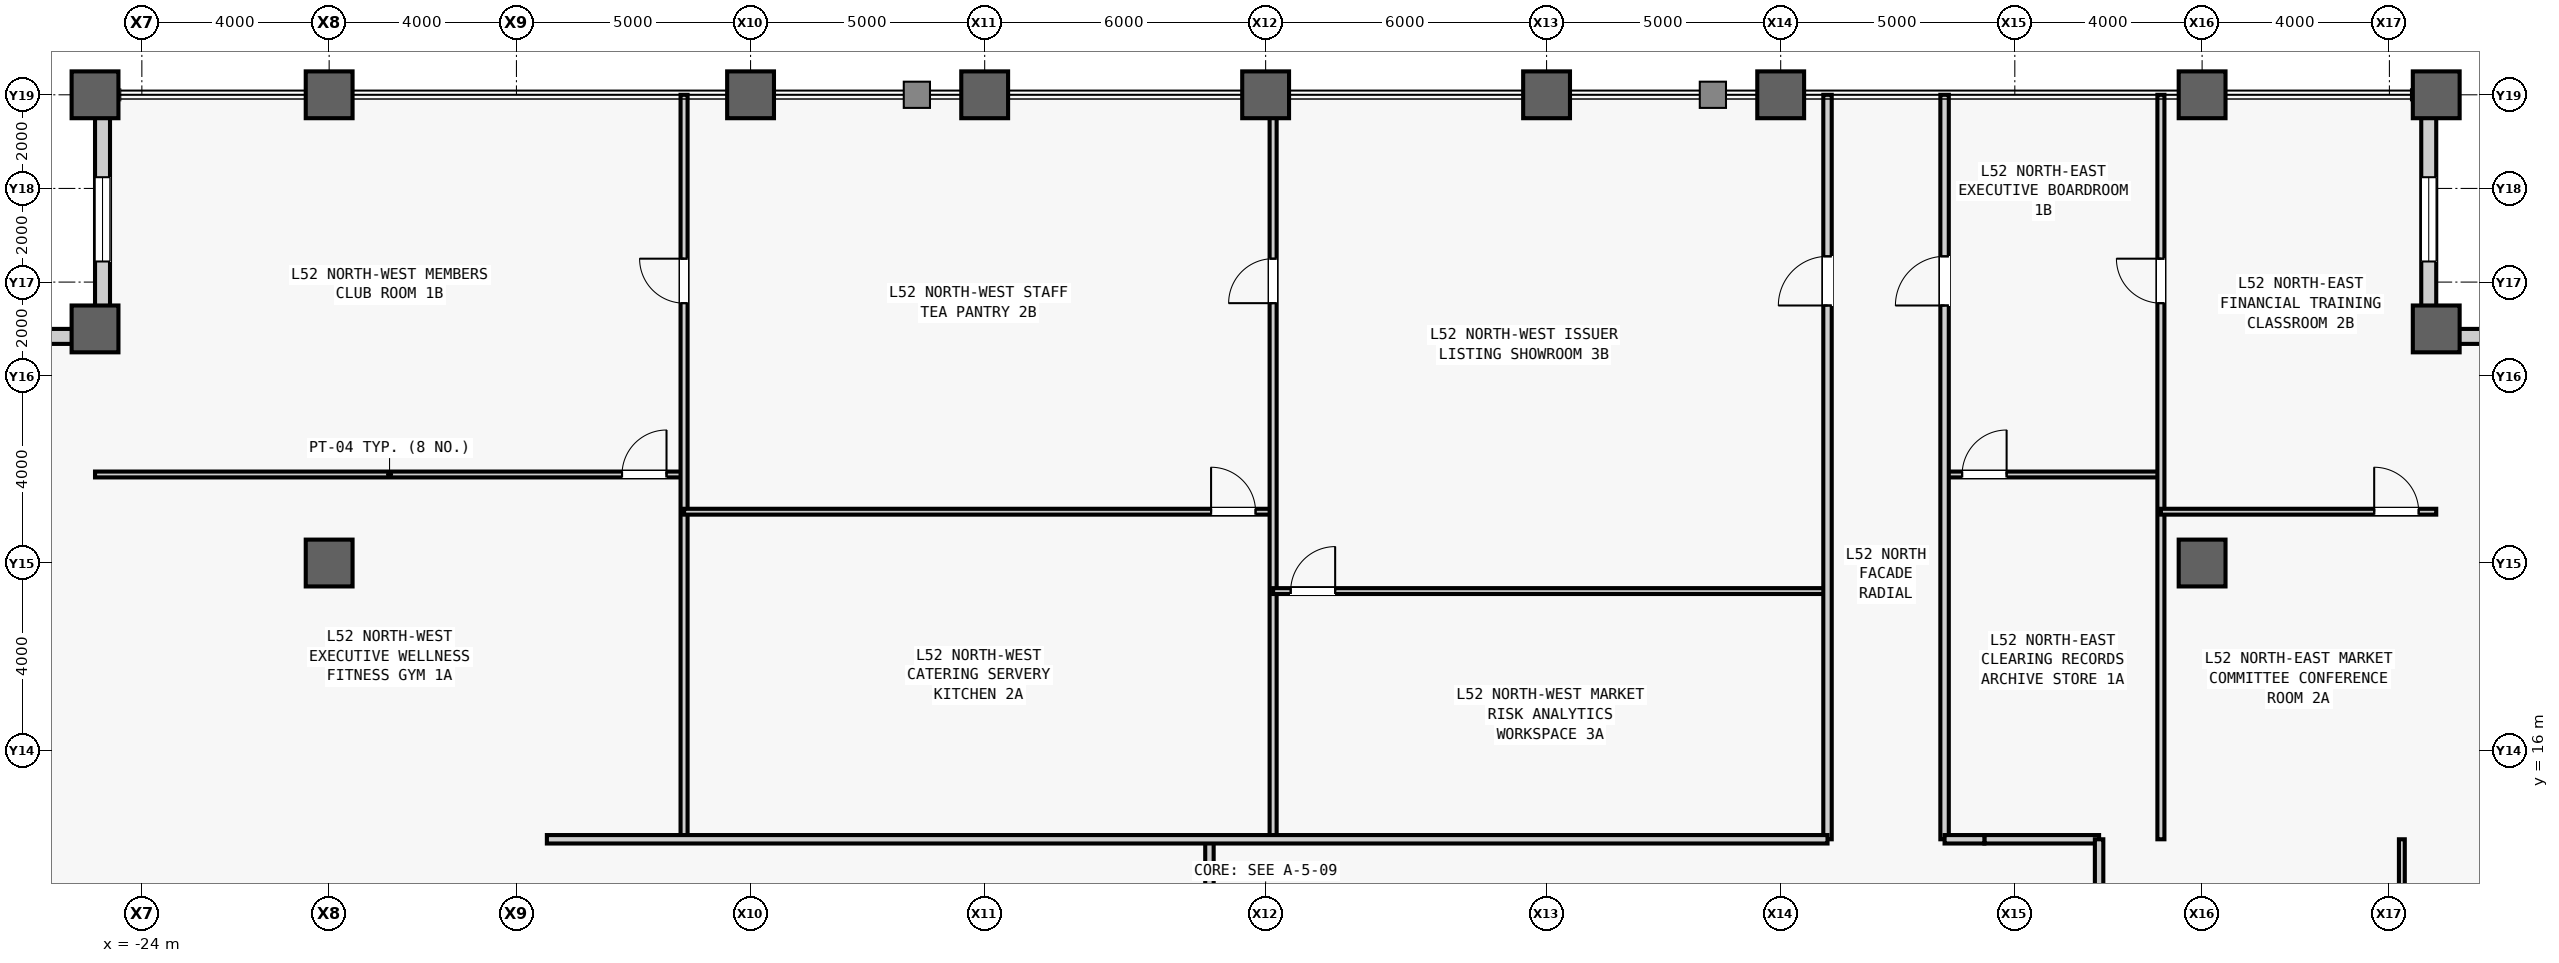
"""IFC4 building model, lengths in metres.
Left out: names, types, materials, properties, quantities, classifications, styles, units other than length and angle.
Written with IfcOpenShell. Run it as: python <this file> out.ifc"""

import sys

from ifc_helpers import new_model, si_unit, direction, frame, frame_2d, origin, origin_2d, place, context, subcontext, project, spatial, rectangle, hollow_rectangle, extrude, source, transform, mapped, element, fill, save


model = new_model("IFC4")
c1 = context("Model", 3, precision=1e-05, world=origin(), true_north=direction((0.0, 1.0)))
c2 = subcontext(c1, "Body", "Model", "MODEL_VIEW")
j1 = project(units=[si_unit("LENGTHUNIT", "METRE"), si_unit("PLANEANGLEUNIT", "RADIAN")], contexts=[c1])
p1 = place(None, origin())
s1 = spatial("IfcSite", under=j1, at=p1, CompositionType="ELEMENT")
p2 = place(p1, origin())
s2 = spatial("IfcBuilding", under=s1, at=p2, CompositionType="ELEMENT")
p3 = place(p2, frame((0.0, 0.0, 223.1)))
s3 = spatial("IfcBuildingStorey", under=s2, at=p3, CompositionType="ELEMENT", Elevation=223.1)
m1 = source(origin(), c2, "Body", "SweptSolid", [
    extrude(hollow_rectangle(XDim=1.0, YDim=1.0, WallThickness=0.055, at=origin_2d()), origin(), (0.0, 0.0, 1.0), 4.0),
])
for number, where, z_axis, x_axis in (
    (1, (-25.0, 25.0, 0.0), (0.0, 0.0, 1.0), (1.0, 0.0, 0.0)),
    (2, (-25.0, 30.0, 0.0), (0.0, 0.0, 1.0), (1.0, 0.0, 0.0)),
    (3, (-20.0, 20.0, 0.0), (0.0, 0.0, 1.0), (1.0, 0.0, 0.0)),
    (4, (-20.0, 30.0, 0.0), (0.0, 0.0, 1.0), (1.0, 0.0, 0.0)),
    (5, (-11.0, 30.0, 0.0), (0.0, 0.0, 1.0), (1.0, 0.0, 0.0)),
    (6, (-6.0, 30.0, 0.0), (0.0, 0.0, 1.0), (1.0, 0.0, 0.0)),
    (7, (0.0, 30.0, 0.0), (0.0, 0.0, 1.0), (1.0, 0.0, 0.0)),
    (8, (6.0, 30.0, 0.0), (0.0, 0.0, 1.0), (1.0, 0.0, 0.0)),
    (9, (11.0, 30.0, 0.0), (0.0, 0.0, 1.0), (1.0, 0.0, 0.0)),
    (10, (20.0, 20.0, 0.0), (0.0, 0.0, 1.0), (1.0, 0.0, 0.0)),
    (11, (20.0, 30.0, 0.0), (0.0, 0.0, 1.0), (1.0, 0.0, 0.0)),
    (12, (25.0, 25.0, 0.0), (0.0, 0.0, 1.0), (1.0, 0.0, 0.0)),
    (13, (25.0, 30.0, 0.0), (0.0, 0.0, 1.0), (1.0, 0.0, 0.0)),
):
    element("IfcColumn", number, at=place(p3, frame(where, z_axis=z_axis, x_axis=x_axis)), inside=s3, PredefinedType="COLUMN", context=c2, shape_type="MappedRepresentation", body=[
        mapped(m1, transform((0.0, 0.0, 0.0), scale=1.0)),
    ])
m2 = source(origin(), c2, "Body", "SweptSolid", [
    extrude(rectangle(XDim=4.68, YDim=0.32, at=frame_2d((2.34, 0.0))), origin(), (0.0, 0.0, 1.0), 3.164),
])
p4 = place(p3, frame((25.0, 24.84, 0.0), z_axis=(0.0, 0.0, 1.0), x_axis=(1.0, 0.0, 0.0)))
e14 = element("IfcWall", 14, at=p4, inside=s3, PredefinedType="STANDARD", context=c2, shape_type="MappedRepresentation", body=[
    mapped(m2, transform((0.0, 0.0, 0.0), scale=1.0)),
])
m3 = source(origin(), c2, "Body", "SweptSolid", [
    extrude(rectangle(XDim=1.8, YDim=2.4, at=frame_2d((0.9, 1.2))), frame((0.0, 0.17, 0.0), z_axis=(0.0, -1.0, 0.0), x_axis=(1.0, 0.0, 0.0)), (0.0, 0.0, 1.0), 0.34),
])
p5 = place(p4, frame((1.44, 0.0, 0.5)))
e15 = element("IfcOpeningElement", 15, at=p5, cuts=e14, PredefinedType="OPENING", context=c2, shape_type="MappedRepresentation", body=[
    mapped(m3, transform((0.0, 0.0, 0.0), scale=1.0)),
])
p6 = place(p3, frame((24.84, 25.0, 0.0), z_axis=(0.0, 0.0, 1.0), x_axis=(0.0, 1.0, 0.0)))
e16 = element("IfcWall", 16, at=p6, inside=s3, PredefinedType="STANDARD", context=c2, shape_type="MappedRepresentation", body=[
    mapped(m2, transform((0.0, 0.0, 0.0), scale=1.0)),
])
p7 = place(p6, frame((1.44, 0.0, 0.5)))
e17 = element("IfcOpeningElement", 17, at=p7, cuts=e16, PredefinedType="OPENING", context=c2, shape_type="MappedRepresentation", body=[
    mapped(m3, transform((0.0, 0.0, 0.0), scale=1.0)),
])
p8 = place(p3, frame((-24.84, 25.0, 0.0), z_axis=(0.0, 0.0, 1.0), x_axis=(0.0, 1.0, 0.0)))
e18 = element("IfcWall", 18, at=p8, inside=s3, PredefinedType="STANDARD", context=c2, shape_type="MappedRepresentation", body=[
    mapped(m2, transform((0.0, 0.0, 0.0), scale=1.0)),
])
p9 = place(p8, frame((1.44, 0.0, 0.5)))
e19 = element("IfcOpeningElement", 19, at=p9, cuts=e18, PredefinedType="OPENING", context=c2, shape_type="MappedRepresentation", body=[
    mapped(m3, transform((0.0, 0.0, 0.0), scale=1.0)),
])
p10 = place(p3, frame((-25.0, 24.84, 0.0), z_axis=(0.0, 0.0, 1.0), x_axis=(-1.0, 0.0, 0.0)))
e20 = element("IfcWall", 20, at=p10, inside=s3, PredefinedType="STANDARD", context=c2, shape_type="MappedRepresentation", body=[
    mapped(m2, transform((0.0, 0.0, 0.0), scale=1.0)),
])
p11 = place(p10, frame((1.44, 0.0, 0.5)))
e21 = element("IfcOpeningElement", 21, at=p11, cuts=e20, PredefinedType="OPENING", context=c2, shape_type="MappedRepresentation", body=[
    mapped(m3, transform((0.0, 0.0, 0.0), scale=1.0)),
])
m4 = source(origin(), c2, "Body", "SweptSolid", [
    extrude(rectangle(XDim=2.45, YDim=0.18, at=frame_2d((1.225, 0.0))), origin(), (0.0, 0.0, 1.0), 3.78),
])
p12 = place(p3, frame((15.35, 14.1, 0.0), z_axis=(0.0, 0.0, 1.0), x_axis=(1.0, 0.0, 0.0)))
e22 = element("IfcWall", 22, at=p12, inside=s3, PredefinedType="PARTITIONING", context=c2, shape_type="MappedRepresentation", body=[
    mapped(m4, transform((0.0, 0.0, 0.0), scale=1.0)),
])
m5 = source(origin(), c2, "Body", "SweptSolid", [
    extrude(rectangle(XDim=3.1, YDim=0.18, at=frame_2d((1.55, 0.0))), origin(), (0.0, 0.0, 1.0), 3.78),
])
p13 = place(p3, frame((-1.2, 11.0, 0.0), z_axis=(0.0, 0.0, 1.0), x_axis=(0.0, 1.0, 0.0)))
e23 = element("IfcWall", 23, at=p13, inside=s3, PredefinedType="PARTITIONING", context=c2, shape_type="MappedRepresentation", body=[
    mapped(m5, transform((0.0, 0.0, 0.0), scale=1.0)),
])
m6 = source(origin(), c2, "Body", "SweptSolid", [
    extrude(rectangle(XDim=12.58, YDim=0.125, at=frame_2d((6.29, 0.0))), origin(), (0.0, 0.0, 1.0), 3.78),
])
p14 = place(p3, frame((-25.0, 21.891, 0.0), z_axis=(0.0, 0.0, 1.0), x_axis=(1.0, 0.0, 0.0)))
e24 = element("IfcWall", 24, at=p14, inside=s3, PredefinedType="PARTITIONING", context=c2, shape_type="MappedRepresentation", body=[
    mapped(m6, transform((0.0, 0.0, 0.0), scale=1.0)),
])
m7 = source(origin(), c2, "Body", "SweptSolid", [
    extrude(rectangle(XDim=0.95, YDim=2.15, at=frame_2d((0.475, 1.075))), frame((0.0, 0.073, 0.0), z_axis=(0.0, -1.0, 0.0), x_axis=(1.0, 0.0, 0.0)), (0.0, 0.0, 1.0), 0.145),
])
p15 = place(p14, frame((11.255, 0.0, 0.0)))
e25 = element("IfcOpeningElement", 25, at=p15, cuts=e24, PredefinedType="OPENING", context=c2, shape_type="MappedRepresentation", body=[
    mapped(m7, transform((0.0, 0.0, 0.0), scale=1.0)),
])
m8 = source(origin(), c2, "Body", "SweptSolid", [
    extrude(rectangle(XDim=15.9, YDim=0.15, at=frame_2d((7.95, 0.0))), origin(), (0.0, 0.0, 1.0), 3.78),
])
p16 = place(p3, frame((-12.42, 14.1, 0.0), z_axis=(0.0, 0.0, 1.0), x_axis=(0.0, 1.0, 0.0)))
e26 = element("IfcWall", 26, at=p16, inside=s3, PredefinedType="PARTITIONING", context=c2, shape_type="MappedRepresentation", body=[
    mapped(m8, transform((0.0, 0.0, 0.0), scale=1.0)),
])
m9 = source(origin(), c2, "Body", "SweptSolid", [
    extrude(rectangle(XDim=0.95, YDim=2.15, at=frame_2d((0.475, 1.075))), frame((0.0, 0.085, 0.0), z_axis=(0.0, -1.0, 0.0), x_axis=(1.0, 0.0, 0.0)), (0.0, 0.0, 1.0), 0.17),
])
p17 = place(p16, frame((11.45, 0.0, 0.0)))
e27 = element("IfcOpeningElement", 27, at=p17, cuts=e26, PredefinedType="OPENING", context=c2, shape_type="MappedRepresentation", body=[
    mapped(m9, transform((0.0, 0.0, 0.0), scale=1.0)),
])
m10 = source(origin(), c2, "Body", "SweptSolid", [
    extrude(rectangle(XDim=12.58, YDim=0.125, at=frame_2d((6.29, 0.0))), origin(), (0.0, 0.0, 1.0), 3.78),
])
p18 = place(p3, frame((-12.42, 21.096, 0.0), z_axis=(0.0, 0.0, 1.0), x_axis=(1.0, 0.0, 0.0)))
e28 = element("IfcWall", 28, at=p18, inside=s3, PredefinedType="PARTITIONING", context=c2, shape_type="MappedRepresentation", body=[
    mapped(m10, transform((0.0, 0.0, 0.0), scale=1.0)),
])
p19 = place(p18, frame((11.255, 0.0, 0.0)))
e29 = element("IfcOpeningElement", 29, at=p19, cuts=e28, PredefinedType="OPENING", context=c2, shape_type="MappedRepresentation", body=[
    mapped(m7, transform((0.0, 0.0, 0.0), scale=1.0)),
])
m11 = source(origin(), c2, "Body", "SweptSolid", [
    extrude(rectangle(XDim=15.9, YDim=0.15, at=frame_2d((7.95, 0.0))), origin(), (0.0, 0.0, 1.0), 3.085),
])
p20 = place(p3, frame((0.16, 14.1, 0.0), z_axis=(0.0, 0.0, 1.0), x_axis=(0.0, 1.0, 0.0)))
e30 = element("IfcWall", 30, at=p20, inside=s3, PredefinedType="PARTITIONING", context=c2, shape_type="MappedRepresentation", body=[
    mapped(m11, transform((0.0, 0.0, 0.0), scale=1.0)),
])
p21 = place(p20, frame((11.45, 0.0, 0.0)))
e31 = element("IfcOpeningElement", 31, at=p21, cuts=e30, PredefinedType="OPENING", context=c2, shape_type="MappedRepresentation", body=[
    mapped(m9, transform((0.0, 0.0, 0.0), scale=1.0)),
])
m12 = source(origin(), c2, "Body", "SweptSolid", [
    extrude(rectangle(XDim=11.84, YDim=0.125, at=frame_2d((5.92, 0.0))), origin(), (0.0, 0.0, 1.0), 3.363),
])
p22 = place(p3, frame((0.16, 19.401, 0.0), z_axis=(0.0, 0.0, 1.0), x_axis=(1.0, 0.0, 0.0)))
e32 = element("IfcWall", 32, at=p22, inside=s3, PredefinedType="PARTITIONING", context=c2, shape_type="MappedRepresentation", body=[
    mapped(m12, transform((0.0, 0.0, 0.0), scale=1.0)),
])
p23 = place(p22, frame((0.375, 0.0, 0.0)))
e33 = element("IfcOpeningElement", 33, at=p23, cuts=e32, PredefinedType="OPENING", context=c2, shape_type="MappedRepresentation", body=[
    mapped(m7, transform((0.0, 0.0, 0.0), scale=1.0)),
])
m13 = source(origin(), c2, "Body", "SweptSolid", [
    extrude(rectangle(XDim=15.9, YDim=0.18, at=frame_2d((7.95, 0.0))), origin(), (0.0, 0.0, 1.0), 3.78),
])
p24 = place(p3, frame((12.0, 14.1, 0.0), z_axis=(0.0, 0.0, 1.0), x_axis=(0.0, 1.0, 0.0)))
e34 = element("IfcWall", 34, at=p24, inside=s3, PredefinedType="PARTITIONING", context=c2, shape_type="MappedRepresentation", body=[
    mapped(m13, transform((0.0, 0.0, 0.0), scale=1.0)),
])
m14 = source(origin(), c2, "Body", "SweptSolid", [
    extrude(rectangle(XDim=1.05, YDim=2.2, at=frame_2d((0.525, 1.1))), frame((0.0, 0.1, 0.0), z_axis=(0.0, -1.0, 0.0), x_axis=(1.0, 0.0, 0.0)), (0.0, 0.0, 1.0), 0.2),
])
p25 = place(p24, frame((11.4, 0.0, 0.0)))
e35 = element("IfcOpeningElement", 35, at=p25, cuts=e34, PredefinedType="OPENING", context=c2, shape_type="MappedRepresentation", body=[
    mapped(m14, transform((0.0, 0.0, 0.0), scale=1.0)),
])
m15 = source(origin(), c2, "Body", "SweptSolid", [
    extrude(rectangle(XDim=27.35, YDim=0.18, at=frame_2d((13.675, 0.0))), origin(), (0.0, 0.0, 1.0), 3.78),
])
p26 = place(p3, frame((-15.35, 14.1, 0.0), z_axis=(0.0, 0.0, 1.0), x_axis=(1.0, 0.0, 0.0)))
e36 = element("IfcWall", 36, at=p26, inside=s3, PredefinedType="PARTITIONING", context=c2, shape_type="MappedRepresentation", body=[
    mapped(m15, transform((0.0, 0.0, 0.0), scale=1.0)),
])
m16 = source(origin(), c2, "Body", "SweptSolid", [
    extrude(rectangle(XDim=4.62, YDim=0.125, at=frame_2d((2.31, 0.0))), origin(), (0.0, 0.0, 1.0), 3.78),
])
p27 = place(p3, frame((14.5, 21.891, 0.0), z_axis=(0.0, 0.0, 1.0), x_axis=(1.0, 0.0, 0.0)))
e37 = element("IfcWall", 37, at=p27, inside=s3, PredefinedType="PARTITIONING", context=c2, shape_type="MappedRepresentation", body=[
    mapped(m16, transform((0.0, 0.0, 0.0), scale=1.0)),
])
p28 = place(p27, frame((0.375, 0.0, 0.0)))
e38 = element("IfcOpeningElement", 38, at=p28, cuts=e37, PredefinedType="OPENING", context=c2, shape_type="MappedRepresentation", body=[
    mapped(m7, transform((0.0, 0.0, 0.0), scale=1.0)),
])
p29 = place(p3, frame((19.12, 14.1, 0.0), z_axis=(0.0, 0.0, 1.0), x_axis=(0.0, 1.0, 0.0)))
e39 = element("IfcWall", 39, at=p29, inside=s3, PredefinedType="PARTITIONING", context=c2, shape_type="MappedRepresentation", body=[
    mapped(m8, transform((0.0, 0.0, 0.0), scale=1.0)),
])
p30 = place(p29, frame((11.45, 0.0, 0.0)))
e40 = element("IfcOpeningElement", 40, at=p30, cuts=e39, PredefinedType="OPENING", context=c2, shape_type="MappedRepresentation", body=[
    mapped(m9, transform((0.0, 0.0, 0.0), scale=1.0)),
])
m17 = source(origin(), c2, "Body", "SweptSolid", [
    extrude(rectangle(XDim=5.88, YDim=0.125, at=frame_2d((2.94, 0.0))), origin(), (0.0, 0.0, 1.0), 3.78),
])
p31 = place(p3, frame((19.12, 21.096, 0.0), z_axis=(0.0, 0.0, 1.0), x_axis=(1.0, 0.0, 0.0)))
e41 = element("IfcWall", 41, at=p31, inside=s3, PredefinedType="PARTITIONING", context=c2, shape_type="MappedRepresentation", body=[
    mapped(m17, transform((0.0, 0.0, 0.0), scale=1.0)),
])
p32 = place(p31, frame((4.555, 0.0, 0.0)))
e42 = element("IfcOpeningElement", 42, at=p32, cuts=e41, PredefinedType="OPENING", context=c2, shape_type="MappedRepresentation", body=[
    mapped(m7, transform((0.0, 0.0, 0.0), scale=1.0)),
])
p33 = place(p3, frame((14.5, 14.1, 0.0), z_axis=(0.0, 0.0, 1.0), x_axis=(0.0, 1.0, 0.0)))
e43 = element("IfcWall", 43, at=p33, inside=s3, PredefinedType="PARTITIONING", context=c2, shape_type="MappedRepresentation", body=[
    mapped(m13, transform((0.0, 0.0, 0.0), scale=1.0)),
])
p34 = place(p33, frame((11.4, 0.0, 0.0)))
e44 = element("IfcOpeningElement", 44, at=p34, cuts=e43, PredefinedType="OPENING", context=c2, shape_type="MappedRepresentation", body=[
    mapped(m14, transform((0.0, 0.0, 0.0), scale=1.0)),
])
m18 = source(origin(), c2, "Body", "SweptSolid", [
    extrude(rectangle(XDim=0.85, YDim=0.18, at=frame_2d((0.425, 0.0))), origin(), (0.0, 0.0, 1.0), 3.78),
])
p35 = place(p3, frame((14.5, 14.1, 0.0), z_axis=(0.0, 0.0, 1.0), x_axis=(1.0, 0.0, 0.0)))
e45 = element("IfcWall", 45, at=p35, inside=s3, PredefinedType="PARTITIONING", context=c2, shape_type="MappedRepresentation", body=[
    mapped(m18, transform((0.0, 0.0, 0.0), scale=1.0)),
])
m19 = source(origin(), c2, "Body", "SweptSolid", [
    extrude(rectangle(XDim=12.1, YDim=0.125, at=frame_2d((6.05, 0.0))), origin(), (0.0, 0.0, 1.0), 3.78),
])
p36 = place(p3, frame((24.266, 2.0, 0.0), z_axis=(0.0, 0.0, 1.0), x_axis=(0.0, 1.0, 0.0)))
e46 = element("IfcWall", 46, at=p36, inside=s3, PredefinedType="PARTITIONING", context=c2, shape_type="MappedRepresentation", body=[
    mapped(m19, transform((0.0, 0.0, 0.0), scale=1.0)),
])
m20 = source(origin(), c2, "Body", "SweptSolid", [
    extrude(rectangle(XDim=12.1, YDim=0.18, at=frame_2d((6.05, 0.0))), origin(), (0.0, 0.0, 1.0), 3.78),
])
p37 = place(p3, frame((17.8, 2.0, 0.0), z_axis=(0.0, 0.0, 1.0), x_axis=(0.0, 1.0, 0.0)))
e47 = element("IfcWall", 47, at=p37, inside=s3, PredefinedType="PARTITIONING", context=c2, shape_type="MappedRepresentation", body=[
    mapped(m20, transform((0.0, 0.0, 0.0), scale=1.0)),
])
m21 = source(origin(), c2, "Body", "SweptSolid", [
    extrude(rectangle(XDim=1.8, YDim=2.4, at=frame_2d((0.9, 1.2))), frame((0.0, 0.03, 0.0), z_axis=(0.0, -1.0, 0.0), x_axis=(1.0, 0.0, 0.0)), (0.0, 0.0, 1.0), 0.06),
])
p38 = place(p7, origin())
e48 = element("IfcWindow", 48, at=p38, inside=s3, PartitioningType="SINGLE_PANEL", PredefinedType="WINDOW", context=c2, shape_type="MappedRepresentation", body=[
    mapped(m21, transform((0.0, 0.0, 0.0), scale=1.0)),
])
fill(e17, e48)
p39 = place(p9, origin())
e49 = element("IfcWindow", 49, at=p39, inside=s3, PartitioningType="SINGLE_PANEL", PredefinedType="WINDOW", context=c2, shape_type="MappedRepresentation", body=[
    mapped(m21, transform((0.0, 0.0, 0.0), scale=1.0)),
])
fill(e19, e49)
m22 = source(origin(), c2, "Body", "SweptSolid", [
    extrude(rectangle(XDim=0.95, YDim=2.15, at=frame_2d((0.475, 1.075))), frame((0.0, 0.025, 0.0), z_axis=(0.0, -1.0, 0.0), x_axis=(1.0, 0.0, 0.0)), (0.0, 0.0, 1.0), 0.05),
])
p40 = place(p15, origin())
e50 = element("IfcDoor", 50, at=p40, inside=s3, OperationType="SINGLE_SWING_RIGHT", PredefinedType="DOOR", context=c2, shape_type="MappedRepresentation", body=[
    mapped(m22, transform((0.0, 0.0, 0.0), scale=1.0)),
])
fill(e25, e50)
p41 = place(p17, origin())
e51 = element("IfcDoor", 51, at=p41, inside=s3, OperationType="SINGLE_SWING_RIGHT", PredefinedType="DOOR", context=c2, shape_type="MappedRepresentation", body=[
    mapped(m22, transform((0.0, 0.0, 0.0), scale=1.0)),
])
fill(e27, e51)
p42 = place(p19, origin())
e52 = element("IfcDoor", 52, at=p42, inside=s3, OperationType="SINGLE_SWING_LEFT", PredefinedType="DOOR", context=c2, shape_type="MappedRepresentation", body=[
    mapped(m22, transform((0.0, 0.0, 0.0), scale=1.0)),
])
fill(e29, e52)
p43 = place(p21, origin())
e53 = element("IfcDoor", 53, at=p43, inside=s3, OperationType="SINGLE_SWING_LEFT", PredefinedType="DOOR", context=c2, shape_type="MappedRepresentation", body=[
    mapped(m22, transform((0.0, 0.0, 0.0), scale=1.0)),
])
fill(e31, e53)
p44 = place(p23, origin())
e54 = element("IfcDoor", 54, at=p44, inside=s3, OperationType="SINGLE_SWING_RIGHT", PredefinedType="DOOR", context=c2, shape_type="MappedRepresentation", body=[
    mapped(m22, transform((0.0, 0.0, 0.0), scale=1.0)),
])
fill(e33, e54)
m23 = source(origin(), c2, "Body", "SweptSolid", [
    extrude(rectangle(XDim=1.05, YDim=2.2, at=frame_2d((0.525, 1.1))), frame((0.0, 0.025, 0.0), z_axis=(0.0, -1.0, 0.0), x_axis=(1.0, 0.0, 0.0)), (0.0, 0.0, 1.0), 0.05),
])
p45 = place(p25, origin())
e55 = element("IfcDoor", 55, at=p45, inside=s3, OperationType="SINGLE_SWING_LEFT", PredefinedType="DOOR", context=c2, shape_type="MappedRepresentation", body=[
    mapped(m23, transform((0.0, 0.0, 0.0), scale=1.0)),
])
fill(e35, e55)
p46 = place(p28, origin())
e56 = element("IfcDoor", 56, at=p46, inside=s3, OperationType="SINGLE_SWING_RIGHT", PredefinedType="DOOR", context=c2, shape_type="MappedRepresentation", body=[
    mapped(m22, transform((0.0, 0.0, 0.0), scale=1.0)),
])
fill(e38, e56)
p47 = place(p30, origin())
e57 = element("IfcDoor", 57, at=p47, inside=s3, OperationType="SINGLE_SWING_RIGHT", PredefinedType="DOOR", context=c2, shape_type="MappedRepresentation", body=[
    mapped(m22, transform((0.0, 0.0, 0.0), scale=1.0)),
])
fill(e40, e57)
p48 = place(p32, origin())
e58 = element("IfcDoor", 58, at=p48, inside=s3, OperationType="SINGLE_SWING_LEFT", PredefinedType="DOOR", context=c2, shape_type="MappedRepresentation", body=[
    mapped(m22, transform((0.0, 0.0, 0.0), scale=1.0)),
])
fill(e42, e58)
p49 = place(p34, origin())
e59 = element("IfcDoor", 59, at=p49, inside=s3, OperationType="SINGLE_SWING_LEFT", PredefinedType="DOOR", context=c2, shape_type="MappedRepresentation", body=[
    mapped(m23, transform((0.0, 0.0, 0.0), scale=1.0)),
])
fill(e44, e59)
save(model, sys.argv[1])
